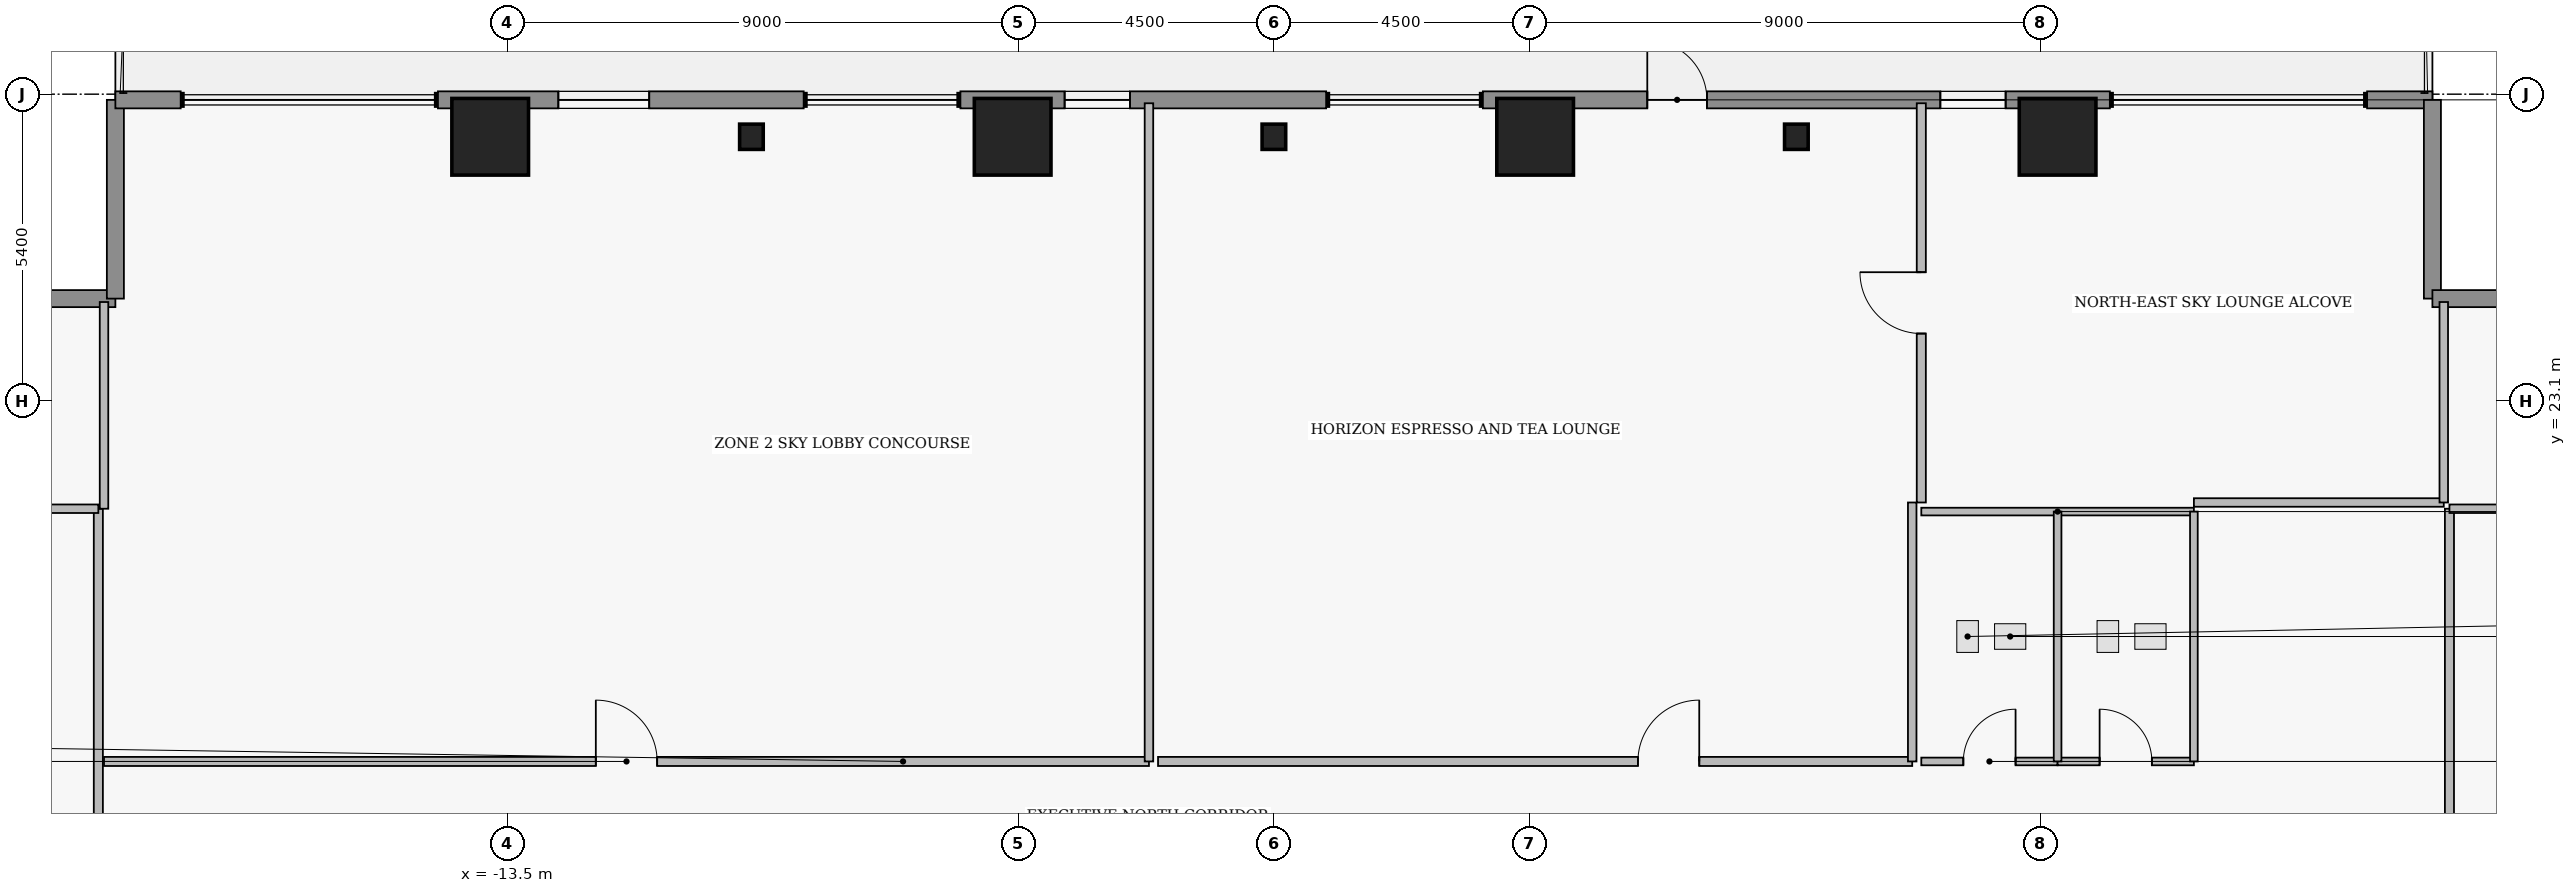
"""IFC4 building model, lengths in metres.
Left out: names, types, materials, properties, quantities, classifications, styles, units other than length and angle.
Written with IfcOpenShell. Run it as: python <this file> out.ifc"""

import sys

from ifc_helpers import new_model, si_unit, direction, frame, frame_2d, origin, origin_2d, place, context, subcontext, project, spatial, rectangle, i_section, extrude, element, fill, save


model = new_model("IFC4")
c1 = context("Model", 3, precision=1e-05, world=origin(), true_north=direction((0.0, 1.0)))
c2 = subcontext(c1, "Body", "Model", "MODEL_VIEW")
j1 = project(units=[si_unit("LENGTHUNIT", "METRE"), si_unit("PLANEANGLEUNIT", "RADIAN")], contexts=[c1])
p1 = place(None, origin())
s1 = spatial("IfcSite", under=j1, at=p1, CompositionType="ELEMENT")
p2 = place(p1, origin())
s2 = spatial("IfcBuilding", under=s1, at=p2, CompositionType="ELEMENT")
p3 = place(p2, frame((0.0, 0.0, 154.05)))
s3 = spatial("IfcBuildingStorey", under=s2, at=p3, CompositionType="ELEMENT", Elevation=154.05)
for number, where, z_axis, x_axis in (
    (1, (-13.8, 27.75, 0.0), (0.0, 0.0, 1.0), (1.0, 0.0, 0.0)),
    (2, (-4.6, 27.75, 0.0), (0.0, 0.0, 1.0), (1.0, 0.0, 0.0)),
    (3, (4.6, 27.75, 0.0), (0.0, 0.0, 1.0), (1.0, 0.0, 0.0)),
    (4, (13.8, 27.75, 0.0), (0.0, 0.0, 1.0), (1.0, 0.0, 0.0)),
):
    element("IfcColumn", number, at=place(p3, frame(where, z_axis=z_axis, x_axis=x_axis)), inside=s3, PredefinedType="COLUMN", context=c2, shape_type="SweptSolid", body=[
        extrude(rectangle(XDim=1.35, YDim=1.35, at=origin_2d()), origin(), (0.0, 0.0, 1.0), 4.5),
    ])
for number, where, z_axis, x_axis in (
    (5, (-9.2, 27.75, -0.22), (0.0, 0.0, 1.0), (1.0, 0.0, 0.0)),
    (6, (0.0, 27.75, -0.22), (0.0, 0.0, 1.0), (1.0, 0.0, 0.0)),
    (7, (9.2, 27.75, -0.22), (0.0, 0.0, 1.0), (1.0, 0.0, 0.0)),
):
    element("IfcColumn", number, at=place(p3, frame(where, z_axis=z_axis, x_axis=x_axis)), inside=s3, PredefinedType="PILASTER", context=c2, shape_type="SweptSolid", body=[
        extrude(i_section(OverallWidth=0.416, OverallDepth=0.445, WebThickness=0.039, FlangeThickness=0.063, at=origin_2d()), origin(), (0.0, 0.0, 1.0), 3.6),
    ])
for number, where, z_axis, x_axis in (
    (8, (-23.9, 24.9, 0.0), (0.0, 0.0, 1.0), (1.0, 0.0, 0.0)),
    (9, (-20.4, 24.9, 0.0), (0.0, 0.0, 1.0), (0.0, 1.0, 0.0)),
):
    element("IfcWall", number, at=place(p3, frame(where, z_axis=z_axis, x_axis=x_axis)), inside=s3, PredefinedType="STANDARD", context=c2, shape_type="SweptSolid", body=[
        extrude(rectangle(XDim=3.5, YDim=0.3, at=frame_2d((1.75, 0.0))), origin(), (0.0, 0.0, 1.0), 4.28),
    ])
p4 = place(p3, frame((-20.4, 28.4, 0.0), z_axis=(0.0, 0.0, 1.0), x_axis=(1.0, 0.0, 0.0)))
e10 = element("IfcWall", 10, at=p4, inside=s3, PredefinedType="STANDARD", context=c2, shape_type="SweptSolid", body=[
    extrude(rectangle(XDim=1.15, YDim=0.3, at=frame_2d((0.575, 0.0))), origin(), (0.0, 0.0, 1.0), 4.28),
])
p5 = place(p3, frame((-14.72, 28.4, 0.0), z_axis=(0.0, 0.0, 1.0), x_axis=(1.0, 0.0, 0.0)))
e11 = element("IfcWall", 11, at=p5, inside=s3, PredefinedType="STANDARD", context=c2, shape_type="SweptSolid", body=[
    extrude(rectangle(XDim=6.44, YDim=0.3, at=frame_2d((3.22, 0.0))), origin(), (0.0, 0.0, 1.0), 4.28),
])
p6 = place(p5, frame((2.12, 0.0, 0.85)))
e12 = element("IfcOpeningElement", 12, at=p6, cuts=e11, PredefinedType="OPENING", context=c2, shape_type="SweptSolid", body=[
    extrude(rectangle(XDim=1.6, YDim=1.8, at=frame_2d((0.8, 0.9))), frame((0.0, 0.16, 0.0), z_axis=(0.0, -1.0, 0.0), x_axis=(1.0, 0.0, 0.0)), (0.0, 0.0, 1.0), 0.32),
])
p7 = place(p3, frame((-5.52, 28.4, 0.0), z_axis=(0.0, 0.0, 1.0), x_axis=(1.0, 0.0, 0.0)))
e13 = element("IfcWall", 13, at=p7, inside=s3, PredefinedType="STANDARD", context=c2, shape_type="SweptSolid", body=[
    extrude(rectangle(XDim=6.44, YDim=0.3, at=frame_2d((3.22, 0.0))), origin(), (0.0, 0.0, 1.0), 4.28),
])
p8 = place(p7, frame((1.835, 0.0, 0.95)))
e14 = element("IfcOpeningElement", 14, at=p8, cuts=e13, PredefinedType="OPENING", context=c2, shape_type="SweptSolid", body=[
    extrude(rectangle(XDim=1.15, YDim=1.55, at=frame_2d((0.575, 0.775))), frame((0.0, 0.16, 0.0), z_axis=(0.0, -1.0, 0.0), x_axis=(1.0, 0.0, 0.0)), (0.0, 0.0, 1.0), 0.32),
])
p9 = place(p3, frame((3.68, 28.4, 0.0), z_axis=(0.0, 0.0, 1.0), x_axis=(1.0, 0.0, 0.0)))
e15 = element("IfcWall", 15, at=p9, inside=s3, PredefinedType="STANDARD", context=c2, shape_type="SweptSolid", body=[
    extrude(rectangle(XDim=11.04, YDim=0.3, at=frame_2d((5.52, 0.0))), origin(), (0.0, 0.0, 1.0), 4.28),
])
p10 = place(p9, frame((2.895, 0.0, 0.0)))
e16 = element("IfcOpeningElement", 16, at=p10, cuts=e15, PredefinedType="OPENING", context=c2, shape_type="SweptSolid", body=[
    extrude(rectangle(XDim=1.05, YDim=2.2, at=frame_2d((0.525, 1.1))), frame((0.0, 0.16, 0.0), z_axis=(0.0, -1.0, 0.0), x_axis=(1.0, 0.0, 0.0)), (0.0, 0.0, 1.0), 0.32),
])
p11 = place(p9, frame((8.055, 0.0, 0.95)))
e17 = element("IfcOpeningElement", 17, at=p11, cuts=e15, PredefinedType="OPENING", context=c2, shape_type="SweptSolid", body=[
    extrude(rectangle(XDim=1.15, YDim=1.55, at=frame_2d((0.575, 0.775))), frame((0.0, 0.16, 0.0), z_axis=(0.0, -1.0, 0.0), x_axis=(1.0, 0.0, 0.0)), (0.0, 0.0, 1.0), 0.32),
])
p12 = place(p3, frame((19.25, 28.4, 0.0), z_axis=(0.0, 0.0, 1.0), x_axis=(1.0, 0.0, 0.0)))
e18 = element("IfcWall", 18, at=p12, inside=s3, PredefinedType="STANDARD", context=c2, shape_type="SweptSolid", body=[
    extrude(rectangle(XDim=1.15, YDim=0.3, at=frame_2d((0.575, 0.0))), origin(), (0.0, 0.0, 1.0), 4.28),
])
for number, where, z_axis, x_axis in (
    (19, (20.4, 28.4, 0.0), (0.0, 0.0, 1.0), (0.0, -1.0, 0.0)),
    (20, (20.4, 24.9, 0.0), (0.0, 0.0, 1.0), (1.0, 0.0, 0.0)),
):
    element("IfcWall", number, at=place(p3, frame(where, z_axis=z_axis, x_axis=x_axis)), inside=s3, PredefinedType="STANDARD", context=c2, shape_type="SweptSolid", body=[
        extrude(rectangle(XDim=3.5, YDim=0.3, at=frame_2d((1.75, 0.0))), origin(), (0.0, 0.0, 1.0), 4.28),
    ])
p13 = place(p3, frame((-20.6, 16.75, 0.0), z_axis=(0.0, 0.0, 1.0), x_axis=(1.0, 0.0, 0.0)))
e21 = element("IfcWall", 21, at=p13, inside=s3, PredefinedType="PARTITIONING", context=c2, shape_type="SweptSolid", body=[
    extrude(rectangle(XDim=18.4, YDim=0.16, at=frame_2d((9.2, 0.0))), origin(), (0.0, 0.0, 1.0), 3.823),
])
p14 = place(p13, frame((8.66, 0.0, 0.0)))
e22 = element("IfcOpeningElement", 22, at=p14, cuts=e21, PredefinedType="OPENING", context=c2, shape_type="SweptSolid", body=[
    extrude(rectangle(XDim=1.08, YDim=2.18, at=frame_2d((0.54, 1.09))), frame((0.0, 0.09, 0.0), z_axis=(0.0, -1.0, 0.0), x_axis=(1.0, 0.0, 0.0)), (0.0, 0.0, 1.0), 0.18),
])
p15 = place(p3, frame((-2.04, 16.75, 0.0), z_axis=(0.0, 0.0, 1.0), x_axis=(1.0, 0.0, 0.0)))
e23 = element("IfcWall", 23, at=p15, inside=s3, PredefinedType="PARTITIONING", context=c2, shape_type="SweptSolid", body=[
    extrude(rectangle(XDim=13.28, YDim=0.16, at=frame_2d((6.64, 0.0))), origin(), (0.0, 0.0, 1.0), 3.823),
])
p16 = place(p15, frame((8.45, 0.0, 0.0)))
e24 = element("IfcOpeningElement", 24, at=p16, cuts=e23, PredefinedType="OPENING", context=c2, shape_type="SweptSolid", body=[
    extrude(rectangle(XDim=1.08, YDim=2.18, at=frame_2d((0.54, 1.09))), frame((0.0, 0.09, 0.0), z_axis=(0.0, -1.0, 0.0), x_axis=(1.0, 0.0, 0.0)), (0.0, 0.0, 1.0), 0.18),
])
p17 = place(p3, frame((20.7, -6.2, 0.0), z_axis=(0.0, 0.0, 1.0), x_axis=(0.0, 1.0, 0.0)))
e25 = element("IfcWall", 25, at=p17, inside=s3, PredefinedType="PARTITIONING", context=c2, shape_type="SweptSolid", body=[
    extrude(rectangle(XDim=27.4, YDim=0.16, at=frame_2d((13.7, 0.0))), origin(), (0.0, 0.0, 1.0), 4.28),
])
p18 = place(p17, frame((13.16, 0.0, 0.0)))
e26 = element("IfcOpeningElement", 26, at=p18, cuts=e25, PredefinedType="OPENING", context=c2, shape_type="SweptSolid", body=[
    extrude(rectangle(XDim=1.08, YDim=2.18, at=frame_2d((0.54, 1.09))), frame((0.0, 0.09, 0.0), z_axis=(0.0, -1.0, 0.0), x_axis=(1.0, 0.0, 0.0)), (0.0, 0.0, 1.0), 0.18),
])
p19 = place(p3, frame((-20.7, -6.2, 0.0), z_axis=(0.0, 0.0, 1.0), x_axis=(0.0, 1.0, 0.0)))
e27 = element("IfcWall", 27, at=p19, inside=s3, PredefinedType="PARTITIONING", context=c2, shape_type="SweptSolid", body=[
    extrude(rectangle(XDim=27.4, YDim=0.16, at=frame_2d((13.7, 0.0))), origin(), (0.0, 0.0, 1.0), 4.28),
])
p20 = place(p19, frame((13.16, 0.0, 0.0)))
e28 = element("IfcOpeningElement", 28, at=p20, cuts=e27, PredefinedType="OPENING", context=c2, shape_type="SweptSolid", body=[
    extrude(rectangle(XDim=1.08, YDim=2.18, at=frame_2d((0.54, 1.09))), frame((0.0, 0.09, 0.0), z_axis=(0.0, -1.0, 0.0), x_axis=(1.0, 0.0, 0.0)), (0.0, 0.0, 1.0), 0.18),
])
p21 = place(p3, frame((11.4, 16.75, 0.0), z_axis=(0.0, 0.0, 1.0), x_axis=(1.0, 0.0, 0.0)))
e29 = element("IfcWall", 29, at=p21, inside=s3, PredefinedType="PLUMBINGWALL", context=c2, shape_type="SweptSolid", body=[
    extrude(rectangle(XDim=2.4, YDim=0.135, at=frame_2d((1.2, 0.0))), origin(), (0.0, 0.0, 1.0), 3.823),
])
p22 = place(p21, frame((0.74, 0.0, 0.0)))
e30 = element("IfcOpeningElement", 30, at=p22, cuts=e29, PredefinedType="OPENING", context=c2, shape_type="SweptSolid", body=[
    extrude(rectangle(XDim=0.92, YDim=2.12, at=frame_2d((0.46, 1.06))), frame((0.0, 0.077, 0.0), z_axis=(0.0, -1.0, 0.0), x_axis=(1.0, 0.0, 0.0)), (0.0, 0.0, 1.0), 0.155),
])
p23 = place(p3, frame((13.8, 16.75, 0.0), z_axis=(0.0, 0.0, 1.0), x_axis=(1.0, 0.0, 0.0)))
e31 = element("IfcWall", 31, at=p23, inside=s3, PredefinedType="PLUMBINGWALL", context=c2, shape_type="SweptSolid", body=[
    extrude(rectangle(XDim=2.4, YDim=0.135, at=frame_2d((1.2, 0.0))), origin(), (0.0, 0.0, 1.0), 4.28),
])
p24 = place(p23, frame((0.74, 0.0, 0.0)))
e32 = element("IfcOpeningElement", 32, at=p24, cuts=e31, PredefinedType="OPENING", context=c2, shape_type="SweptSolid", body=[
    extrude(rectangle(XDim=0.92, YDim=2.12, at=frame_2d((0.46, 1.06))), frame((0.0, 0.077, 0.0), z_axis=(0.0, -1.0, 0.0), x_axis=(1.0, 0.0, 0.0)), (0.0, 0.0, 1.0), 0.155),
])
p25 = place(p3, frame((11.4, 21.31, 0.0), z_axis=(0.0, 0.0, 1.0), x_axis=(0.0, 1.0, 0.0)))
e33 = element("IfcWall", 33, at=p25, inside=s3, PredefinedType="PARTITIONING", context=c2, shape_type="SweptSolid", body=[
    extrude(rectangle(XDim=7.03, YDim=0.16, at=frame_2d((3.515, 0.0))), origin(), (0.0, 0.0, 1.0), 4.28),
])
p26 = place(p25, frame((2.975, 0.0, 0.0)))
e34 = element("IfcOpeningElement", 34, at=p26, cuts=e33, PredefinedType="OPENING", context=c2, shape_type="SweptSolid", body=[
    extrude(rectangle(XDim=1.08, YDim=2.18, at=frame_2d((0.54, 1.09))), frame((0.0, 0.09, 0.0), z_axis=(0.0, -1.0, 0.0), x_axis=(1.0, 0.0, 0.0)), (0.0, 0.0, 1.0), 0.18),
])
p27 = place(p3, frame((-20.6, 21.2, 0.0), z_axis=(0.0, 0.0, 1.0), x_axis=(0.0, 1.0, 0.0)))
e35 = element("IfcWall", 35, at=p27, inside=s3, PredefinedType="PARTITIONING", context=c2, shape_type="SweptSolid", body=[
    extrude(rectangle(XDim=3.64, YDim=0.15, at=frame_2d((1.82, 0.0))), origin(), (0.0, 0.0, 1.0), 4.28),
])
p28 = place(p3, frame((-2.2, 16.75, 0.0), z_axis=(0.0, 0.0, 1.0), x_axis=(0.0, 1.0, 0.0)))
e36 = element("IfcWall", 36, at=p28, inside=s3, PredefinedType="PARTITIONING", context=c2, shape_type="SweptSolid", body=[
    extrude(rectangle(XDim=11.59, YDim=0.15, at=frame_2d((5.795, 0.0))), origin(), (0.0, 0.0, 1.0), 4.28),
])
p29 = place(p3, frame((11.24, 16.75, 0.0), z_axis=(0.0, 0.0, 1.0), x_axis=(0.0, 1.0, 0.0)))
e37 = element("IfcWall", 37, at=p29, inside=s3, PredefinedType="PARTITIONING", context=c2, shape_type="SweptSolid", body=[
    extrude(rectangle(XDim=4.56, YDim=0.15, at=frame_2d((2.28, 0.0))), origin(), (0.0, 0.0, 1.0), 4.28),
])
for number, where, z_axis, x_axis in (
    (38, (20.7, 21.2, 0.0), (0.0, 0.0, 1.0), (1.0, 0.0, 0.0)),
    (39, (-23.84, 21.2, 0.0), (0.0, 0.0, 1.0), (1.0, 0.0, 0.0)),
):
    element("IfcWall", number, at=place(p3, frame(where, z_axis=z_axis, x_axis=x_axis)), inside=s3, PredefinedType="PARTITIONING", context=c2, shape_type="SweptSolid", body=[
        extrude(rectangle(XDim=3.14, YDim=0.15, at=frame_2d((1.57, 0.0))), origin(), (0.0, 0.0, 1.0), 4.28),
    ])
p30 = place(p3, frame((11.4, 21.15, 0.0), z_axis=(0.0, 0.0, 1.0), x_axis=(1.0, 0.0, 0.0)))
e40 = element("IfcWall", 40, at=p30, inside=s3, PredefinedType="PLUMBINGWALL", context=c2, shape_type="SweptSolid", body=[
    extrude(rectangle(XDim=4.8, YDim=0.135, at=frame_2d((2.4, 0.0))), origin(), (0.0, 0.0, 1.0), 4.28),
])
p31 = place(p3, frame((16.2, 16.75, 0.0), z_axis=(0.0, 0.0, 1.0), x_axis=(0.0, 1.0, 0.0)))
e41 = element("IfcWall", 41, at=p31, inside=s3, PredefinedType="PLUMBINGWALL", context=c2, shape_type="SweptSolid", body=[
    extrude(rectangle(XDim=4.4, YDim=0.135, at=frame_2d((2.2, 0.0))), origin(), (0.0, 0.0, 1.0), 4.28),
])
p32 = place(p3, frame((13.8, 16.75, 0.0), z_axis=(0.0, 0.0, 1.0), x_axis=(0.0, 1.0, 0.0)))
e42 = element("IfcWall", 42, at=p32, inside=s3, PredefinedType="PLUMBINGWALL", context=c2, shape_type="SweptSolid", body=[
    extrude(rectangle(XDim=4.4, YDim=0.135, at=frame_2d((2.2, 0.0))), origin(), (0.0, 0.0, 1.0), 3.353),
])
p33 = place(p3, frame((16.2, 21.31, 0.0), z_axis=(0.0, 0.0, 1.0), x_axis=(1.0, 0.0, 0.0)))
e43 = element("IfcWall", 43, at=p33, inside=s3, PredefinedType="PARTITIONING", context=c2, shape_type="SweptSolid", body=[
    extrude(rectangle(XDim=4.4, YDim=0.15, at=frame_2d((2.2, 0.0))), origin(), (0.0, 0.0, 1.0), 4.28),
])
p34 = place(p3, frame((20.6, 21.31, 0.0), z_axis=(0.0, 0.0, 1.0), x_axis=(0.0, 1.0, 0.0)))
e44 = element("IfcWall", 44, at=p34, inside=s3, PredefinedType="PARTITIONING", context=c2, shape_type="SweptSolid", body=[
    extrude(rectangle(XDim=3.53, YDim=0.15, at=frame_2d((1.765, 0.0))), origin(), (0.0, 0.0, 1.0), 4.28),
])
p35 = place(p6, origin())
e45 = element("IfcWindow", 45, at=p35, inside=s3, PartitioningType="SINGLE_PANEL", PredefinedType="WINDOW", context=c2, shape_type="SweptSolid", body=[
    extrude(rectangle(XDim=1.6, YDim=1.8, at=frame_2d((0.8, 0.9))), frame((0.0, 0.03, 0.0), z_axis=(0.0, -1.0, 0.0), x_axis=(1.0, 0.0, 0.0)), (0.0, 0.0, 1.0), 0.06),
])
fill(e12, e45)
p36 = place(p8, origin())
e46 = element("IfcWindow", 46, at=p36, inside=s3, PartitioningType="SINGLE_PANEL", PredefinedType="WINDOW", context=c2, shape_type="SweptSolid", body=[
    extrude(rectangle(XDim=1.15, YDim=1.55, at=frame_2d((0.575, 0.775))), frame((0.0, 0.03, 0.0), z_axis=(0.0, -1.0, 0.0), x_axis=(1.0, 0.0, 0.0)), (0.0, 0.0, 1.0), 0.06),
])
fill(e14, e46)
p37 = place(p10, origin())
e47 = element("IfcDoor", 47, at=p37, inside=s3, OperationType="SINGLE_SWING_LEFT", PredefinedType="DOOR", context=c2, shape_type="SweptSolid", body=[
    extrude(rectangle(XDim=1.05, YDim=2.2, at=frame_2d((0.525, 1.1))), frame((0.0, 0.025, 0.0), z_axis=(0.0, -1.0, 0.0), x_axis=(1.0, 0.0, 0.0)), (0.0, 0.0, 1.0), 0.05),
])
fill(e16, e47)
p38 = place(p11, origin())
e48 = element("IfcWindow", 48, at=p38, inside=s3, PartitioningType="SINGLE_PANEL", PredefinedType="WINDOW", context=c2, shape_type="SweptSolid", body=[
    extrude(rectangle(XDim=1.15, YDim=1.55, at=frame_2d((0.575, 0.775))), frame((0.0, 0.03, 0.0), z_axis=(0.0, -1.0, 0.0), x_axis=(1.0, 0.0, 0.0)), (0.0, 0.0, 1.0), 0.06),
])
fill(e17, e48)
p39 = place(p14, origin())
e49 = element("IfcDoor", 49, at=p39, inside=s3, OperationType="SINGLE_SWING_LEFT", PredefinedType="DOOR", context=c2, shape_type="SweptSolid", body=[
    extrude(rectangle(XDim=1.08, YDim=2.18, at=frame_2d((0.54, 1.09))), frame((0.0, 0.025, 0.0), z_axis=(0.0, -1.0, 0.0), x_axis=(1.0, 0.0, 0.0)), (0.0, 0.0, 1.0), 0.05),
])
fill(e22, e49)
p40 = place(p16, origin())
e50 = element("IfcDoor", 50, at=p40, inside=s3, OperationType="SINGLE_SWING_RIGHT", PredefinedType="DOOR", context=c2, shape_type="SweptSolid", body=[
    extrude(rectangle(XDim=1.08, YDim=2.18, at=frame_2d((0.54, 1.09))), frame((0.0, 0.025, 0.0), z_axis=(0.0, -1.0, 0.0), x_axis=(1.0, 0.0, 0.0)), (0.0, 0.0, 1.0), 0.05),
])
fill(e24, e50)
p41 = place(p22, origin())
e51 = element("IfcDoor", 51, at=p41, inside=s3, OperationType="SINGLE_SWING_RIGHT", PredefinedType="DOOR", context=c2, shape_type="SweptSolid", body=[
    extrude(rectangle(XDim=0.92, YDim=2.12, at=frame_2d((0.46, 1.06))), frame((0.0, 0.025, 0.0), z_axis=(0.0, -1.0, 0.0), x_axis=(1.0, 0.0, 0.0)), (0.0, 0.0, 1.0), 0.05),
])
fill(e30, e51)
p42 = place(p24, origin())
e52 = element("IfcDoor", 52, at=p42, inside=s3, OperationType="SINGLE_SWING_LEFT", PredefinedType="DOOR", context=c2, shape_type="SweptSolid", body=[
    extrude(rectangle(XDim=0.92, YDim=2.12, at=frame_2d((0.46, 1.06))), frame((0.0, 0.025, 0.0), z_axis=(0.0, -1.0, 0.0), x_axis=(1.0, 0.0, 0.0)), (0.0, 0.0, 1.0), 0.05),
])
fill(e32, e52)
p43 = place(p26, origin())
e53 = element("IfcDoor", 53, at=p43, inside=s3, OperationType="SINGLE_SWING_RIGHT", PredefinedType="DOOR", context=c2, shape_type="SweptSolid", body=[
    extrude(rectangle(XDim=1.08, YDim=2.18, at=frame_2d((0.54, 1.09))), frame((0.0, 0.025, 0.0), z_axis=(0.0, -1.0, 0.0), x_axis=(1.0, 0.0, 0.0)), (0.0, 0.0, 1.0), 0.05),
])
fill(e34, e53)
save(model, sys.argv[1])
